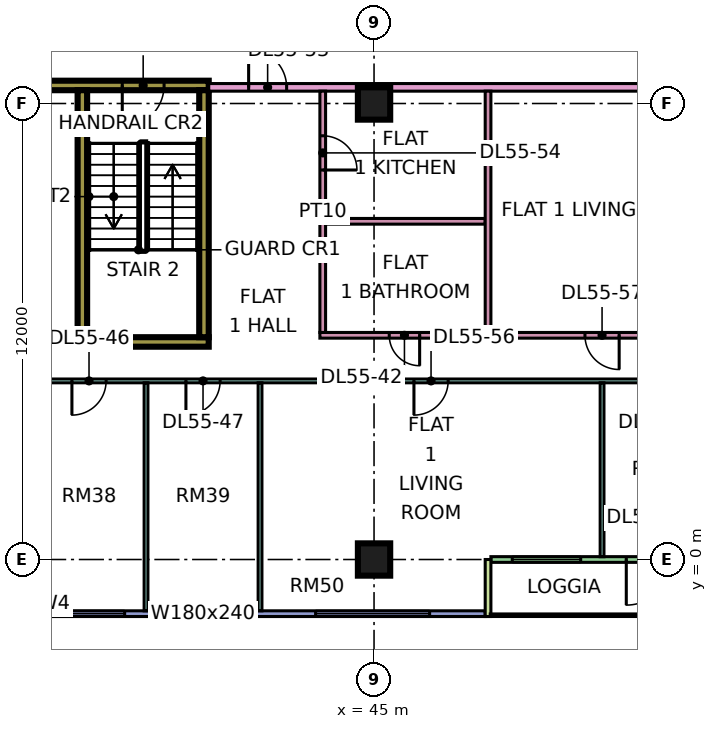
"""IFC4 building model, lengths in metres.
Left out: names, types, materials, properties, quantities, classifications, styles, units other than length and angle.
Written with IfcOpenShell. Run it as: python <this file> out.ifc"""

import sys

from ifc_helpers import new_model, si_unit, direction, frame, frame_2d, origin, origin_2d, place, context, subcontext, project, spatial, rectangle, extrude, element, fill, save


model = new_model("IFC4")
c1 = context("Model", 3, precision=1e-05, world=origin(), true_north=direction((0.0, 1.0)))
c2 = subcontext(c1, "Body", "Model", "MODEL_VIEW")
j1 = project(units=[si_unit("LENGTHUNIT", "METRE"), si_unit("PLANEANGLEUNIT", "RADIAN")], contexts=[c1])
p1 = place(None, origin())
s1 = spatial("IfcSite", under=j1, at=p1, CompositionType="ELEMENT")
p2 = place(p1, origin())
s2 = spatial("IfcBuilding", under=s1, at=p2, CompositionType="ELEMENT")
p3 = place(p2, frame((0.0, 0.0, 234.15)))
s3 = spatial("IfcBuildingStorey", under=s2, at=p3, CompositionType="ELEMENT", Elevation=234.15)
for number, where, z_axis, x_axis in (
    (1, (45.0, 0.0, 0.0), (0.0, 0.0, 1.0), (1.0, 0.0, 0.0)),
    (2, (45.0, 12.0, 0.0), (0.0, 0.0, 1.0), (1.0, 0.0, 0.0)),
):
    element("IfcColumn", number, at=place(p3, frame(where, z_axis=z_axis, x_axis=x_axis)), inside=s3, PredefinedType="COLUMN", context=c2, shape_type="SweptSolid", body=[
        extrude(rectangle(XDim=0.85, YDim=0.85, at=origin_2d()), origin(), (0.0, 0.0, 1.0), 3.75),
    ])
p4 = place(p3, frame((37.2, 5.725, 0.0), z_axis=(0.0, 0.0, 1.0), x_axis=(1.0, 0.0, 0.0)))
e3 = element("IfcWall", 3, at=p4, inside=s3, PredefinedType="SHEAR", context=c2, shape_type="SweptSolid", body=[
    extrude(rectangle(XDim=3.45, YDim=0.25, at=frame_2d((1.725, 0.0))), origin(), (0.0, 0.0, 1.0), 3.75),
])
p5 = place(p3, frame((36.425, 12.475, 0.0), z_axis=(0.0, 0.0, 1.0), x_axis=(1.0, 0.0, 0.0)))
e4 = element("IfcWall", 4, at=p5, inside=s3, PredefinedType="SHEAR", context=c2, shape_type="SweptSolid", body=[
    extrude(rectangle(XDim=4.225, YDim=0.25, at=frame_2d((2.112, 0.0))), origin(), (0.0, 0.0, 1.0), 3.75),
])
p6 = place(p5, frame((1.95, 0.0, 0.0)))
e5 = element("IfcOpeningElement", 5, at=p6, cuts=e4, PredefinedType="OPENING", context=c2, shape_type="SweptSolid", body=[
    extrude(rectangle(XDim=1.1, YDim=2.2, at=frame_2d((0.55, 1.1))), frame((0.0, 0.135, 0.0), z_axis=(0.0, -1.0, 0.0), x_axis=(1.0, 0.0, 0.0)), (0.0, 0.0, 1.0), 0.27),
])
for number, where, z_axis, x_axis in (
    (6, (37.325, 5.85, 0.0), (0.0, 0.0, 1.0), (0.0, 1.0, 0.0)),
    (7, (40.525, 5.85, 0.0), (0.0, 0.0, 1.0), (0.0, 1.0, 0.0)),
):
    element("IfcWall", number, at=place(p3, frame(where, z_axis=z_axis, x_axis=x_axis)), inside=s3, PredefinedType="SHEAR", context=c2, shape_type="SweptSolid", body=[
        extrude(rectangle(XDim=6.5, YDim=0.25, at=frame_2d((3.25, 0.0))), origin(), (0.0, 0.0, 1.0), 3.75),
    ])
p7 = place(p3, frame((36.075, -1.425, 0.0), z_axis=(0.0, 0.0, 1.0), x_axis=(1.0, 0.0, 0.0)))
e8 = element("IfcWall", 8, at=p7, inside=s3, PredefinedType="SOLIDWALL", context=c2, shape_type="SweptSolid", body=[
    extrude(rectangle(XDim=11.85, YDim=0.15, at=frame_2d((5.925, 0.0))), origin(), (0.0, 0.0, 1.0), 3.35),
])
p8 = place(p7, frame((0.562, 0.0, 0.45)))
e9 = element("IfcOpeningElement", 9, at=p8, cuts=e8, PredefinedType="OPENING", context=c2, shape_type="SweptSolid", body=[
    extrude(rectangle(XDim=1.8, YDim=2.4, at=frame_2d((0.9, 1.2))), frame((0.0, 0.085, 0.0), z_axis=(0.0, -1.0, 0.0), x_axis=(1.0, 0.0, 0.0)), (0.0, 0.0, 1.0), 0.17),
])
p9 = place(p7, frame((3.525, 0.0, 0.45)))
e10 = element("IfcOpeningElement", 10, at=p9, cuts=e8, PredefinedType="OPENING", context=c2, shape_type="SweptSolid", body=[
    extrude(rectangle(XDim=1.8, YDim=2.4, at=frame_2d((0.9, 1.2))), frame((0.0, 0.085, 0.0), z_axis=(0.0, -1.0, 0.0), x_axis=(1.0, 0.0, 0.0)), (0.0, 0.0, 1.0), 0.17),
])
p10 = place(p7, frame((7.387, 0.0, 0.45)))
e11 = element("IfcOpeningElement", 11, at=p10, cuts=e8, PredefinedType="OPENING", context=c2, shape_type="SweptSolid", body=[
    extrude(rectangle(XDim=3.0, YDim=2.4, at=frame_2d((1.5, 1.2))), frame((0.0, 0.085, 0.0), z_axis=(0.0, -1.0, 0.0), x_axis=(1.0, 0.0, 0.0)), (0.0, 0.0, 1.0), 0.17),
])
p11 = place(p3, frame((48.075, 0.0, 0.0), z_axis=(0.0, 0.0, 1.0), x_axis=(1.0, 0.0, 0.0)))
e12 = element("IfcWall", 12, at=p11, inside=s3, PredefinedType="SOLIDWALL", context=c2, shape_type="SweptSolid", body=[
    extrude(rectangle(XDim=13.35, YDim=0.15, at=frame_2d((6.675, 0.0))), origin(), (0.0, 0.0, 1.0), 3.35),
])
p12 = place(p11, frame((0.562, 0.0, 0.45)))
e13 = element("IfcOpeningElement", 13, at=p12, cuts=e12, PredefinedType="OPENING", context=c2, shape_type="SweptSolid", body=[
    extrude(rectangle(XDim=1.8, YDim=2.4, at=frame_2d((0.9, 1.2))), frame((0.0, 0.085, 0.0), z_axis=(0.0, -1.0, 0.0), x_axis=(1.0, 0.0, 0.0)), (0.0, 0.0, 1.0), 0.17),
])
p13 = place(p11, frame((3.562, 0.0, 0.0)))
e14 = element("IfcOpeningElement", 14, at=p13, cuts=e12, PredefinedType="OPENING", context=c2, shape_type="SweptSolid", body=[
    extrude(rectangle(XDim=1.2, YDim=2.4, at=frame_2d((0.6, 1.2))), frame((0.0, 0.085, 0.0), z_axis=(0.0, -1.0, 0.0), x_axis=(1.0, 0.0, 0.0)), (0.0, 0.0, 1.0), 0.17),
])
p14 = place(p11, frame((7.688, 0.0, 0.45)))
e15 = element("IfcOpeningElement", 15, at=p14, cuts=e12, PredefinedType="OPENING", context=c2, shape_type="SweptSolid", body=[
    extrude(rectangle(XDim=3.0, YDim=2.4, at=frame_2d((1.5, 1.2))), frame((0.0, 0.085, 0.0), z_axis=(0.0, -1.0, 0.0), x_axis=(1.0, 0.0, 0.0)), (0.0, 0.0, 1.0), 0.17),
])
p15 = place(p3, frame((48.0, -1.5, 0.0), z_axis=(0.0, 0.0, 1.0), x_axis=(0.0, 1.0, 0.0)))
e16 = element("IfcWall", 16, at=p15, inside=s3, PredefinedType="SOLIDWALL", context=c2, shape_type="SweptSolid", body=[
    extrude(rectangle(XDim=1.5, YDim=0.15, at=frame_2d((0.75, 0.0))), origin(), (0.0, 0.0, 1.0), 3.35),
])
p16 = place(p3, frame((33.05, 4.7, 0.0), z_axis=(0.0, 0.0, 1.0), x_axis=(1.0, 0.0, 0.0)))
e17 = element("IfcWall", 17, at=p16, inside=s3, PredefinedType="PARTITIONING", context=c2, shape_type="SweptSolid", body=[
    extrude(rectangle(XDim=20.85, YDim=0.1, at=frame_2d((10.425, 0.0))), origin(), (0.0, 0.0, 1.0), 3.35),
])
p17 = place(p16, frame((1.0, 0.0, 0.0)))
e18 = element("IfcOpeningElement", 18, at=p17, cuts=e17, PredefinedType="OPENING", context=c2, shape_type="SweptSolid", body=[
    extrude(rectangle(XDim=0.9, YDim=2.1, at=frame_2d((0.45, 1.05))), frame((0.0, 0.06, 0.0), z_axis=(0.0, -1.0, 0.0), x_axis=(1.0, 0.0, 0.0)), (0.0, 0.0, 1.0), 0.12),
])
p18 = place(p16, frame((4.0, 0.0, 0.0)))
e19 = element("IfcOpeningElement", 19, at=p18, cuts=e17, PredefinedType="OPENING", context=c2, shape_type="SweptSolid", body=[
    extrude(rectangle(XDim=0.9, YDim=2.1, at=frame_2d((0.45, 1.05))), frame((0.0, 0.06, 0.0), z_axis=(0.0, -1.0, 0.0), x_axis=(1.0, 0.0, 0.0)), (0.0, 0.0, 1.0), 0.12),
])
p19 = place(p16, frame((7.0, 0.0, 0.0)))
e20 = element("IfcOpeningElement", 20, at=p19, cuts=e17, PredefinedType="OPENING", context=c2, shape_type="SweptSolid", body=[
    extrude(rectangle(XDim=0.9, YDim=2.1, at=frame_2d((0.45, 1.05))), frame((0.0, 0.06, 0.0), z_axis=(0.0, -1.0, 0.0), x_axis=(1.0, 0.0, 0.0)), (0.0, 0.0, 1.0), 0.12),
])
p20 = place(p16, frame((19.0, 0.0, 0.0)))
e21 = element("IfcOpeningElement", 21, at=p20, cuts=e17, PredefinedType="OPENING", context=c2, shape_type="SweptSolid", body=[
    extrude(rectangle(XDim=0.9, YDim=2.1, at=frame_2d((0.45, 1.05))), frame((0.0, 0.06, 0.0), z_axis=(0.0, -1.0, 0.0), x_axis=(1.0, 0.0, 0.0)), (0.0, 0.0, 1.0), 0.12),
])
p21 = place(p16, frame((13.0, 0.0, 0.0)))
e22 = element("IfcOpeningElement", 22, at=p21, cuts=e17, PredefinedType="OPENING", context=c2, shape_type="SweptSolid", body=[
    extrude(rectangle(XDim=0.9, YDim=2.1, at=frame_2d((0.45, 1.05))), frame((0.0, 0.06, 0.0), z_axis=(0.0, -1.0, 0.0), x_axis=(1.0, 0.0, 0.0)), (0.0, 0.0, 1.0), 0.12),
])
p22 = place(p3, frame((39.0, -1.351, 0.0), z_axis=(0.0, 0.0, 1.0), x_axis=(0.0, 1.0, 0.0)))
e23 = element("IfcWall", 23, at=p22, inside=s3, PredefinedType="PARTITIONING", context=c2, shape_type="SweptSolid", body=[
    extrude(rectangle(XDim=6.001, YDim=0.1, at=frame_2d((3.0, 0.0))), origin(), (0.0, 0.0, 1.0), 3.35),
])
p23 = place(p3, frame((40.65, 12.425, 0.0), z_axis=(0.0, 0.0, 1.0), x_axis=(1.0, 0.0, 0.0)))
e24 = element("IfcWall", 24, at=p23, inside=s3, PredefinedType="PARTITIONING", context=c2, shape_type="SweptSolid", body=[
    extrude(rectangle(XDim=22.35, YDim=0.2, at=frame_2d((11.175, 0.0))), origin(), (0.0, 0.0, 1.0), 3.35),
])
p24 = place(p23, frame((14.7, 0.0, 0.0)))
e25 = element("IfcOpeningElement", 25, at=p24, cuts=e24, PredefinedType="OPENING", context=c2, shape_type="SweptSolid", body=[
    extrude(rectangle(XDim=1.0, YDim=2.1, at=frame_2d((0.5, 1.05))), frame((0.0, 0.11, 0.0), z_axis=(0.0, -1.0, 0.0), x_axis=(1.0, 0.0, 0.0)), (0.0, 0.0, 1.0), 0.22),
])
p25 = place(p23, frame((1.05, 0.0, 0.0)))
e26 = element("IfcOpeningElement", 26, at=p25, cuts=e24, PredefinedType="OPENING", context=c2, shape_type="SweptSolid", body=[
    extrude(rectangle(XDim=1.0, YDim=2.1, at=frame_2d((0.5, 1.05))), frame((0.0, 0.11, 0.0), z_axis=(0.0, -1.0, 0.0), x_axis=(1.0, 0.0, 0.0)), (0.0, 0.0, 1.0), 0.22),
])
p26 = place(p3, frame((42.0, -1.35, 0.0), z_axis=(0.0, 0.0, 1.0), x_axis=(0.0, 1.0, 0.0)))
e27 = element("IfcWall", 27, at=p26, inside=s3, PredefinedType="PARTITIONING", context=c2, shape_type="SweptSolid", body=[
    extrude(rectangle(XDim=6.0, YDim=0.1, at=frame_2d((3.0, 0.0))), origin(), (0.0, 0.0, 1.0), 3.35),
])
p27 = place(p3, frame((43.575, 5.9, 0.0), z_axis=(0.0, 0.0, 1.0), x_axis=(1.0, 0.0, 0.0)))
e28 = element("IfcWall", 28, at=p27, inside=s3, PredefinedType="PARTITIONING", context=c2, shape_type="SweptSolid", body=[
    extrude(rectangle(XDim=10.325, YDim=0.15, at=frame_2d((5.163, 0.0))), origin(), (0.0, 0.0, 1.0), 3.35),
])
p28 = place(p27, frame((1.825, 0.0, 0.0)))
e29 = element("IfcOpeningElement", 29, at=p28, cuts=e28, PredefinedType="OPENING", context=c2, shape_type="SweptSolid", body=[
    extrude(rectangle(XDim=0.8, YDim=2.1, at=frame_2d((0.4, 1.05))), frame((0.0, 0.085, 0.0), z_axis=(0.0, -1.0, 0.0), x_axis=(1.0, 0.0, 0.0)), (0.0, 0.0, 1.0), 0.17),
])
p29 = place(p27, frame((6.975, 0.0, 0.0)))
e30 = element("IfcOpeningElement", 30, at=p29, cuts=e28, PredefinedType="OPENING", context=c2, shape_type="SweptSolid", body=[
    extrude(rectangle(XDim=0.9, YDim=2.1, at=frame_2d((0.45, 1.05))), frame((0.0, 0.085, 0.0), z_axis=(0.0, -1.0, 0.0), x_axis=(1.0, 0.0, 0.0)), (0.0, 0.0, 1.0), 0.17),
])
p30 = place(p3, frame((43.65, 5.975, 0.0), z_axis=(0.0, 0.0, 1.0), x_axis=(0.0, 1.0, 0.0)))
e31 = element("IfcWall", 31, at=p30, inside=s3, PredefinedType="PARTITIONING", context=c2, shape_type="SweptSolid", body=[
    extrude(rectangle(XDim=6.35, YDim=0.15, at=frame_2d((3.175, 0.0))), origin(), (0.0, 0.0, 1.0), 3.35),
])
p31 = place(p30, frame((4.275, 0.0, 0.0)))
e32 = element("IfcOpeningElement", 32, at=p31, cuts=e31, PredefinedType="OPENING", context=c2, shape_type="SweptSolid", body=[
    extrude(rectangle(XDim=0.9, YDim=2.1, at=frame_2d((0.45, 1.05))), frame((0.0, 0.085, 0.0), z_axis=(0.0, -1.0, 0.0), x_axis=(1.0, 0.0, 0.0)), (0.0, 0.0, 1.0), 0.17),
])
p32 = place(p3, frame((43.725, 8.9, 0.0), z_axis=(0.0, 0.0, 1.0), x_axis=(1.0, 0.0, 0.0)))
e33 = element("IfcWall", 33, at=p32, inside=s3, PredefinedType="PARTITIONING", context=c2, shape_type="SweptSolid", body=[
    extrude(rectangle(XDim=4.2, YDim=0.15, at=frame_2d((2.1, 0.0))), origin(), (0.0, 0.0, 1.0), 3.35),
])
p33 = place(p3, frame((48.0, 5.975, 0.0), z_axis=(0.0, 0.0, 1.0), x_axis=(0.0, 1.0, 0.0)))
e34 = element("IfcWall", 34, at=p33, inside=s3, PredefinedType="PARTITIONING", context=c2, shape_type="SweptSolid", body=[
    extrude(rectangle(XDim=6.35, YDim=0.15, at=frame_2d((3.175, 0.0))), origin(), (0.0, 0.0, 1.0), 3.35),
])
p34 = place(p3, frame((51.0, 0.074, 0.0), z_axis=(0.0, 0.0, 1.0), x_axis=(0.0, 1.0, 0.0)))
e35 = element("IfcWall", 35, at=p34, inside=s3, PredefinedType="PARTITIONING", context=c2, shape_type="SweptSolid", body=[
    extrude(rectangle(XDim=4.576, YDim=0.1, at=frame_2d((2.288, 0.0))), origin(), (0.0, 0.0, 1.0), 3.35),
])
p35 = place(p8, origin())
e36 = element("IfcWindow", 36, at=p35, inside=s3, PartitioningType="SINGLE_PANEL", PredefinedType="WINDOW", context=c2, shape_type="SweptSolid", body=[
    extrude(rectangle(XDim=1.8, YDim=2.4, at=frame_2d((0.9, 1.2))), frame((0.0, 0.03, 0.0), z_axis=(0.0, -1.0, 0.0), x_axis=(1.0, 0.0, 0.0)), (0.0, 0.0, 1.0), 0.06),
])
fill(e9, e36)
p36 = place(p9, origin())
e37 = element("IfcWindow", 37, at=p36, inside=s3, PartitioningType="SINGLE_PANEL", PredefinedType="WINDOW", context=c2, shape_type="SweptSolid", body=[
    extrude(rectangle(XDim=1.8, YDim=2.4, at=frame_2d((0.9, 1.2))), frame((0.0, 0.03, 0.0), z_axis=(0.0, -1.0, 0.0), x_axis=(1.0, 0.0, 0.0)), (0.0, 0.0, 1.0), 0.06),
])
fill(e10, e37)
p37 = place(p10, origin())
e38 = element("IfcWindow", 38, at=p37, inside=s3, PartitioningType="SINGLE_PANEL", PredefinedType="WINDOW", context=c2, shape_type="SweptSolid", body=[
    extrude(rectangle(XDim=3.0, YDim=2.4, at=frame_2d((1.5, 1.2))), frame((0.0, 0.03, 0.0), z_axis=(0.0, -1.0, 0.0), x_axis=(1.0, 0.0, 0.0)), (0.0, 0.0, 1.0), 0.06),
])
fill(e11, e38)
p38 = place(p12, origin())
e39 = element("IfcWindow", 39, at=p38, inside=s3, PartitioningType="SINGLE_PANEL", PredefinedType="WINDOW", context=c2, shape_type="SweptSolid", body=[
    extrude(rectangle(XDim=1.8, YDim=2.4, at=frame_2d((0.9, 1.2))), frame((0.0, 0.03, 0.0), z_axis=(0.0, -1.0, 0.0), x_axis=(1.0, 0.0, 0.0)), (0.0, 0.0, 1.0), 0.06),
])
fill(e13, e39)
p39 = place(p13, frame((1.2, 0.0, 0.0), z_axis=(0.0, 0.0, 1.0), x_axis=(-1.0, 0.0, 0.0)))
e40 = element("IfcDoor", 40, at=p39, inside=s3, OperationType="DOUBLE_DOOR_SINGLE_SWING", PredefinedType="DOOR", context=c2, shape_type="SweptSolid", body=[
    extrude(rectangle(XDim=1.2, YDim=2.4, at=frame_2d((0.6, 1.2))), frame((0.0, 0.025, 0.0), z_axis=(0.0, -1.0, 0.0), x_axis=(1.0, 0.0, 0.0)), (0.0, 0.0, 1.0), 0.05),
])
fill(e14, e40)
p40 = place(p6, frame((1.1, 0.0, 0.0), z_axis=(0.0, 0.0, 1.0), x_axis=(-1.0, 0.0, 0.0)))
e41 = element("IfcDoor", 41, at=p40, inside=s3, OperationType="SINGLE_SWING_LEFT", PredefinedType="DOOR", context=c2, shape_type="SweptSolid", body=[
    extrude(rectangle(XDim=1.1, YDim=2.2, at=frame_2d((0.55, 1.1))), frame((0.0, 0.025, 0.0), z_axis=(0.0, -1.0, 0.0), x_axis=(1.0, 0.0, 0.0)), (0.0, 0.0, 1.0), 0.05),
])
fill(e5, e41)
p41 = place(p28, origin())
e42 = element("IfcDoor", 42, at=p41, inside=s3, OperationType="SINGLE_SWING_RIGHT", PredefinedType="DOOR", context=c2, shape_type="SweptSolid", body=[
    extrude(rectangle(XDim=0.8, YDim=2.1, at=frame_2d((0.4, 1.05))), frame((0.0, 0.025, 0.0), z_axis=(0.0, -1.0, 0.0), x_axis=(1.0, 0.0, 0.0)), (0.0, 0.0, 1.0), 0.05),
])
fill(e29, e42)
p42 = place(p18, frame((0.9, 0.0, 0.0), z_axis=(0.0, 0.0, 1.0), x_axis=(-1.0, 0.0, 0.0)))
e43 = element("IfcDoor", 43, at=p42, inside=s3, OperationType="SINGLE_SWING_LEFT", PredefinedType="DOOR", context=c2, shape_type="SweptSolid", body=[
    extrude(rectangle(XDim=0.9, YDim=2.1, at=frame_2d((0.45, 1.05))), frame((0.0, 0.025, 0.0), z_axis=(0.0, -1.0, 0.0), x_axis=(1.0, 0.0, 0.0)), (0.0, 0.0, 1.0), 0.05),
])
fill(e19, e43)
p43 = place(p19, frame((0.9, 0.0, 0.0), z_axis=(0.0, 0.0, 1.0), x_axis=(-1.0, 0.0, 0.0)))
e44 = element("IfcDoor", 44, at=p43, inside=s3, OperationType="SINGLE_SWING_LEFT", PredefinedType="DOOR", context=c2, shape_type="SweptSolid", body=[
    extrude(rectangle(XDim=0.9, YDim=2.1, at=frame_2d((0.45, 1.05))), frame((0.0, 0.025, 0.0), z_axis=(0.0, -1.0, 0.0), x_axis=(1.0, 0.0, 0.0)), (0.0, 0.0, 1.0), 0.05),
])
fill(e20, e44)
p44 = place(p25, origin())
e45 = element("IfcDoor", 45, at=p44, inside=s3, OperationType="SINGLE_SWING_LEFT", PredefinedType="DOOR", context=c2, shape_type="SweptSolid", body=[
    extrude(rectangle(XDim=1.0, YDim=2.1, at=frame_2d((0.5, 1.05))), frame((0.0, 0.025, 0.0), z_axis=(0.0, -1.0, 0.0), x_axis=(1.0, 0.0, 0.0)), (0.0, 0.0, 1.0), 0.05),
])
fill(e26, e45)
p45 = place(p31, frame((0.9, 0.0, 0.0), z_axis=(0.0, 0.0, 1.0), x_axis=(-1.0, 0.0, 0.0)))
e46 = element("IfcDoor", 46, at=p45, inside=s3, OperationType="SINGLE_SWING_LEFT", PredefinedType="DOOR", context=c2, shape_type="SweptSolid", body=[
    extrude(rectangle(XDim=0.9, YDim=2.1, at=frame_2d((0.45, 1.05))), frame((0.0, 0.025, 0.0), z_axis=(0.0, -1.0, 0.0), x_axis=(1.0, 0.0, 0.0)), (0.0, 0.0, 1.0), 0.05),
])
fill(e32, e46)
p46 = place(p21, frame((0.9, 0.0, 0.0), z_axis=(0.0, 0.0, 1.0), x_axis=(-1.0, 0.0, 0.0)))
e47 = element("IfcDoor", 47, at=p46, inside=s3, OperationType="SINGLE_SWING_LEFT", PredefinedType="DOOR", context=c2, shape_type="SweptSolid", body=[
    extrude(rectangle(XDim=0.9, YDim=2.1, at=frame_2d((0.45, 1.05))), frame((0.0, 0.025, 0.0), z_axis=(0.0, -1.0, 0.0), x_axis=(1.0, 0.0, 0.0)), (0.0, 0.0, 1.0), 0.05),
])
fill(e22, e47)
p47 = place(p29, origin())
e48 = element("IfcDoor", 48, at=p47, inside=s3, OperationType="SINGLE_SWING_RIGHT", PredefinedType="DOOR", context=c2, shape_type="SweptSolid", body=[
    extrude(rectangle(XDim=0.9, YDim=2.1, at=frame_2d((0.45, 1.05))), frame((0.0, 0.025, 0.0), z_axis=(0.0, -1.0, 0.0), x_axis=(1.0, 0.0, 0.0)), (0.0, 0.0, 1.0), 0.05),
])
fill(e30, e48)
save(model, sys.argv[1])
